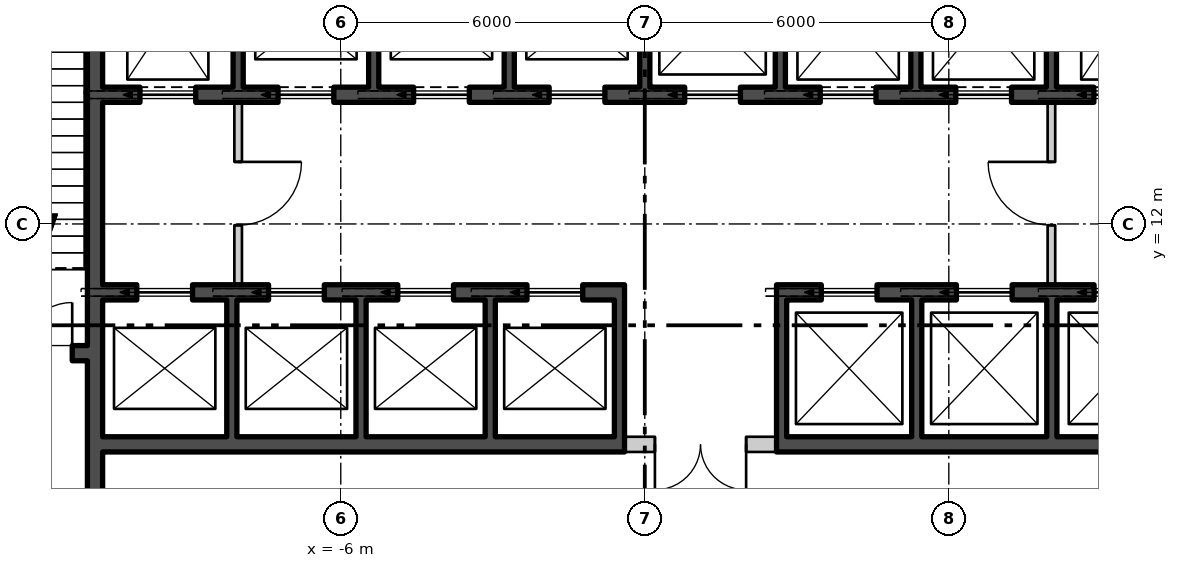
"""IFC4 building model, lengths in metres.
Left out: names, types, materials, properties, quantities, classifications, styles, units other than length and angle.
Written with IfcOpenShell. Run it as: python <this file> out.ifc"""

import sys

from ifc_helpers import new_model, si_unit, direction, frame, frame_2d, origin, place, context, subcontext, project, spatial, rectangle, extrude, element, fill, save


model = new_model("IFC4")
c1 = context("Model", 3, precision=1e-05, world=origin(), true_north=direction((0.0, 1.0)))
c2 = subcontext(c1, "Body", "Model", "MODEL_VIEW")
j1 = project(units=[si_unit("LENGTHUNIT", "METRE"), si_unit("PLANEANGLEUNIT", "RADIAN")], contexts=[c1])
p1 = place(None, origin())
s1 = spatial("IfcSite", under=j1, at=p1, CompositionType="ELEMENT")
p2 = place(p1, origin())
s2 = spatial("IfcBuilding", under=s1, at=p2, CompositionType="ELEMENT")
p3 = place(p2, origin())
s3 = spatial("IfcBuildingStorey", under=s2, at=p3, CompositionType="ELEMENT", Elevation=0.0)
p4 = place(p3, frame((-10.85, 0.6, 0.0), z_axis=(0.0, 0.0, 1.0), x_axis=(0.0, 1.0, 0.0)))
e1 = element("IfcWall", 1, at=p4, inside=s3, PredefinedType="SHEAR", context=c2, shape_type="SweptSolid", body=[
    extrude(rectangle(XDim=16.8, YDim=0.3, at=frame_2d((8.4, 0.0))), origin(), (0.0, 0.0, 1.0), 8.18),
])
p5 = place(p4, frame((1.525, 0.0, 0.0)))
e2 = element("IfcOpeningElement", 2, at=p5, cuts=e1, PredefinedType="OPENING", context=c2, shape_type="SweptSolid", body=[
    extrude(rectangle(XDim=1.0, YDim=2.1, at=frame_2d((0.5, 1.05))), frame((0.0, 0.16, 0.0), z_axis=(0.0, -1.0, 0.0), x_axis=(1.0, 0.0, 0.0)), (0.0, 0.0, 1.0), 0.32),
])
p6 = place(p3, frame((-14.2, 9.45, 0.0), z_axis=(0.0, 0.0, 1.0), x_axis=(1.0, 0.0, 0.0)))
e3 = element("IfcWall", 3, at=p6, inside=s3, PredefinedType="SHEAR", context=c2, shape_type="SweptSolid", body=[
    extrude(rectangle(XDim=3.2, YDim=0.3, at=frame_2d((1.6, 0.0))), origin(), (0.0, 0.0, 1.0), 8.18),
])
p7 = place(p6, frame((1.9, 0.0, 0.0)))
e4 = element("IfcOpeningElement", 4, at=p7, cuts=e3, PredefinedType="OPENING", context=c2, shape_type="SweptSolid", body=[
    extrude(rectangle(XDim=1.0, YDim=2.1, at=frame_2d((0.5, 1.05))), frame((0.0, 0.16, 0.0), z_axis=(0.0, -1.0, 0.0), x_axis=(1.0, 0.0, 0.0)), (0.0, 0.0, 1.0), 0.32),
])
p8 = place(p3, frame((-10.7, 14.55, 0.0), z_axis=(0.0, 0.0, 1.0), x_axis=(1.0, 0.0, 0.0)))
e5 = element("IfcWall", 5, at=p8, inside=s3, PredefinedType="SHEAR", context=c2, shape_type="SweptSolid", body=[
    extrude(rectangle(XDim=21.4, YDim=0.3, at=frame_2d((10.7, 0.0))), origin(), (0.0, 0.0, 1.0), 8.18),
])
p9 = place(p8, frame((0.738, 0.0, 0.0)))
e6 = element("IfcOpeningElement", 6, at=p9, cuts=e5, PredefinedType="OPENING", context=c2, shape_type="SweptSolid", body=[
    extrude(rectangle(XDim=1.1, YDim=2.1, at=frame_2d((0.55, 1.05))), frame((0.0, 0.16, 0.0), z_axis=(0.0, -1.0, 0.0), x_axis=(1.0, 0.0, 0.0)), (0.0, 0.0, 1.0), 0.32),
])
p10 = place(p8, frame((3.462, 0.0, 0.0)))
e7 = element("IfcOpeningElement", 7, at=p10, cuts=e5, PredefinedType="OPENING", context=c2, shape_type="SweptSolid", body=[
    extrude(rectangle(XDim=1.1, YDim=2.1, at=frame_2d((0.55, 1.05))), frame((0.0, 0.16, 0.0), z_axis=(0.0, -1.0, 0.0), x_axis=(1.0, 0.0, 0.0)), (0.0, 0.0, 1.0), 0.32),
])
p11 = place(p8, frame((6.138, 0.0, 0.0)))
e8 = element("IfcOpeningElement", 8, at=p11, cuts=e5, PredefinedType="OPENING", context=c2, shape_type="SweptSolid", body=[
    extrude(rectangle(XDim=1.1, YDim=2.1, at=frame_2d((0.55, 1.05))), frame((0.0, 0.16, 0.0), z_axis=(0.0, -1.0, 0.0), x_axis=(1.0, 0.0, 0.0)), (0.0, 0.0, 1.0), 0.32),
])
p12 = place(p8, frame((8.812, 0.0, 0.0)))
e9 = element("IfcOpeningElement", 9, at=p12, cuts=e5, PredefinedType="OPENING", context=c2, shape_type="SweptSolid", body=[
    extrude(rectangle(XDim=1.1, YDim=2.1, at=frame_2d((0.55, 1.05))), frame((0.0, 0.16, 0.0), z_axis=(0.0, -1.0, 0.0), x_axis=(1.0, 0.0, 0.0)), (0.0, 0.0, 1.0), 0.32),
])
p13 = place(p8, frame((11.488, 0.0, 0.0)))
e10 = element("IfcOpeningElement", 10, at=p13, cuts=e5, PredefinedType="OPENING", context=c2, shape_type="SweptSolid", body=[
    extrude(rectangle(XDim=1.1, YDim=2.1, at=frame_2d((0.55, 1.05))), frame((0.0, 0.16, 0.0), z_axis=(0.0, -1.0, 0.0), x_axis=(1.0, 0.0, 0.0)), (0.0, 0.0, 1.0), 0.32),
])
p14 = place(p8, frame((14.162, 0.0, 0.0)))
e11 = element("IfcOpeningElement", 11, at=p14, cuts=e5, PredefinedType="OPENING", context=c2, shape_type="SweptSolid", body=[
    extrude(rectangle(XDim=1.1, YDim=2.1, at=frame_2d((0.55, 1.05))), frame((0.0, 0.16, 0.0), z_axis=(0.0, -1.0, 0.0), x_axis=(1.0, 0.0, 0.0)), (0.0, 0.0, 1.0), 0.32),
])
p15 = place(p8, frame((16.837, 0.0, 0.0)))
e12 = element("IfcOpeningElement", 12, at=p15, cuts=e5, PredefinedType="OPENING", context=c2, shape_type="SweptSolid", body=[
    extrude(rectangle(XDim=1.1, YDim=2.1, at=frame_2d((0.55, 1.05))), frame((0.0, 0.16, 0.0), z_axis=(0.0, -1.0, 0.0), x_axis=(1.0, 0.0, 0.0)), (0.0, 0.0, 1.0), 0.32),
])
p16 = place(p8, frame((19.562, 0.0, 0.0)))
e13 = element("IfcOpeningElement", 13, at=p16, cuts=e5, PredefinedType="OPENING", context=c2, shape_type="SweptSolid", body=[
    extrude(rectangle(XDim=1.1, YDim=2.1, at=frame_2d((0.55, 1.05))), frame((0.0, 0.16, 0.0), z_axis=(0.0, -1.0, 0.0), x_axis=(1.0, 0.0, 0.0)), (0.0, 0.0, 1.0), 0.32),
])
p17 = place(p3, frame((-10.7, 10.65, 0.0), z_axis=(0.0, 0.0, 1.0), x_axis=(1.0, 0.0, 0.0)))
e14 = element("IfcWall", 14, at=p17, inside=s3, PredefinedType="SHEAR", context=c2, shape_type="SweptSolid", body=[
    extrude(rectangle(XDim=10.3, YDim=0.3, at=frame_2d((5.15, 0.0))), origin(), (0.0, 0.0, 1.0), 8.18),
])
p18 = place(p17, frame((0.675, 0.0, 0.0)))
e15 = element("IfcOpeningElement", 15, at=p18, cuts=e14, PredefinedType="OPENING", context=c2, shape_type="SweptSolid", body=[
    extrude(rectangle(XDim=1.1, YDim=2.1, at=frame_2d((0.55, 1.05))), frame((0.0, 0.16, 0.0), z_axis=(0.0, -1.0, 0.0), x_axis=(1.0, 0.0, 0.0)), (0.0, 0.0, 1.0), 0.32),
])
p19 = place(p17, frame((3.275, 0.0, 0.0)))
e16 = element("IfcOpeningElement", 16, at=p19, cuts=e14, PredefinedType="OPENING", context=c2, shape_type="SweptSolid", body=[
    extrude(rectangle(XDim=1.1, YDim=2.1, at=frame_2d((0.55, 1.05))), frame((0.0, 0.16, 0.0), z_axis=(0.0, -1.0, 0.0), x_axis=(1.0, 0.0, 0.0)), (0.0, 0.0, 1.0), 0.32),
])
p20 = place(p17, frame((5.825, 0.0, 0.0)))
e17 = element("IfcOpeningElement", 17, at=p20, cuts=e14, PredefinedType="OPENING", context=c2, shape_type="SweptSolid", body=[
    extrude(rectangle(XDim=1.1, YDim=2.1, at=frame_2d((0.55, 1.05))), frame((0.0, 0.16, 0.0), z_axis=(0.0, -1.0, 0.0), x_axis=(1.0, 0.0, 0.0)), (0.0, 0.0, 1.0), 0.32),
])
p21 = place(p17, frame((8.375, 0.0, 0.0)))
e18 = element("IfcOpeningElement", 18, at=p21, cuts=e14, PredefinedType="OPENING", context=c2, shape_type="SweptSolid", body=[
    extrude(rectangle(XDim=1.1, YDim=2.1, at=frame_2d((0.55, 1.05))), frame((0.0, 0.16, 0.0), z_axis=(0.0, -1.0, 0.0), x_axis=(1.0, 0.0, 0.0)), (0.0, 0.0, 1.0), 0.32),
])
p22 = place(p3, frame((-10.7, 7.65, 0.0), z_axis=(0.0, 0.0, 1.0), x_axis=(1.0, 0.0, 0.0)))
e19 = element("IfcWall", 19, at=p22, inside=s3, PredefinedType="SHEAR", context=c2, shape_type="SweptSolid", body=[
    extrude(rectangle(XDim=10.3, YDim=0.3, at=frame_2d((5.15, 0.0))), origin(), (0.0, 0.0, 1.0), 8.18),
])
p23 = place(p3, frame((2.6, 10.65, 0.0), z_axis=(0.0, 0.0, 1.0), x_axis=(1.0, 0.0, 0.0)))
e20 = element("IfcWall", 20, at=p23, inside=s3, PredefinedType="SHEAR", context=c2, shape_type="SweptSolid", body=[
    extrude(rectangle(XDim=8.1, YDim=0.3, at=frame_2d((4.05, 0.0))), origin(), (0.0, 0.0, 1.0), 8.18),
])
p24 = place(p23, frame((0.883, 0.0, 0.0)))
e21 = element("IfcOpeningElement", 21, at=p24, cuts=e20, PredefinedType="OPENING", context=c2, shape_type="SweptSolid", body=[
    extrude(rectangle(XDim=1.1, YDim=2.1, at=frame_2d((0.55, 1.05))), frame((0.0, 0.16, 0.0), z_axis=(0.0, -1.0, 0.0), x_axis=(1.0, 0.0, 0.0)), (0.0, 0.0, 1.0), 0.32),
])
p25 = place(p23, frame((3.55, 0.0, 0.0)))
e22 = element("IfcOpeningElement", 22, at=p25, cuts=e20, PredefinedType="OPENING", context=c2, shape_type="SweptSolid", body=[
    extrude(rectangle(XDim=1.1, YDim=2.1, at=frame_2d((0.55, 1.05))), frame((0.0, 0.16, 0.0), z_axis=(0.0, -1.0, 0.0), x_axis=(1.0, 0.0, 0.0)), (0.0, 0.0, 1.0), 0.32),
])
p26 = place(p23, frame((6.267, 0.0, 0.0)))
e23 = element("IfcOpeningElement", 23, at=p26, cuts=e20, PredefinedType="OPENING", context=c2, shape_type="SweptSolid", body=[
    extrude(rectangle(XDim=1.1, YDim=2.1, at=frame_2d((0.55, 1.05))), frame((0.0, 0.16, 0.0), z_axis=(0.0, -1.0, 0.0), x_axis=(1.0, 0.0, 0.0)), (0.0, 0.0, 1.0), 0.32),
])
p27 = place(p3, frame((2.6, 7.65, 0.0), z_axis=(0.0, 0.0, 1.0), x_axis=(1.0, 0.0, 0.0)))
e24 = element("IfcWall", 24, at=p27, inside=s3, PredefinedType="SHEAR", context=c2, shape_type="SweptSolid", body=[
    extrude(rectangle(XDim=8.1, YDim=0.3, at=frame_2d((4.05, 0.0))), origin(), (0.0, 0.0, 1.0), 8.18),
])
for number, where, z_axis, x_axis in (
    (25, (-8.025, 14.7, 0.0), (0.0, 0.0, 1.0), (0.0, 1.0, 0.0)),
    (26, (-5.35, 14.7, 0.0), (0.0, 0.0, 1.0), (0.0, 1.0, 0.0)),
    (27, (-2.675, 14.7, 0.0), (0.0, 0.0, 1.0), (0.0, 1.0, 0.0)),
    (28, (0.0, 14.7, 0.0), (0.0, 0.0, 1.0), (0.0, 1.0, 0.0)),
    (29, (2.675, 14.7, 0.0), (0.0, 0.0, 1.0), (0.0, 1.0, 0.0)),
    (30, (5.35, 14.7, 0.0), (0.0, 0.0, 1.0), (0.0, 1.0, 0.0)),
    (31, (8.025, 14.7, 0.0), (0.0, 0.0, 1.0), (0.0, 1.0, 0.0)),
    (32, (-8.15, 7.8, 0.0), (0.0, 0.0, 1.0), (0.0, 1.0, 0.0)),
    (33, (-5.6, 7.8, 0.0), (0.0, 0.0, 1.0), (0.0, 1.0, 0.0)),
    (34, (-3.05, 7.8, 0.0), (0.0, 0.0, 1.0), (0.0, 1.0, 0.0)),
    (35, (-0.5, 7.8, 0.0), (0.0, 0.0, 1.0), (0.0, 1.0, 0.0)),
    (36, (2.7, 7.8, 0.0), (0.0, 0.0, 1.0), (0.0, 1.0, 0.0)),
    (37, (5.367, 7.8, 0.0), (0.0, 0.0, 1.0), (0.0, 1.0, 0.0)),
    (38, (8.033, 7.8, 0.0), (0.0, 0.0, 1.0), (0.0, 1.0, 0.0)),
):
    element("IfcWall", number, at=place(p3, frame(where, z_axis=z_axis, x_axis=x_axis)), inside=s3, PredefinedType="SHEAR", context=c2, shape_type="SweptSolid", body=[
        extrude(rectangle(XDim=2.7, YDim=0.2, at=frame_2d((1.35, 0.0))), origin(), (0.0, 0.0, 1.0), 8.18),
    ])
p28 = place(p3, frame((-8.025, 10.8, 0.0), z_axis=(0.0, 0.0, 1.0), x_axis=(0.0, 1.0, 0.0)))
e39 = element("IfcWall", 39, at=p28, inside=s3, PredefinedType="PARTITIONING", context=c2, shape_type="SweptSolid", body=[
    extrude(rectangle(XDim=3.6, YDim=0.15, at=frame_2d((1.8, 0.0))), origin(), (0.0, 0.0, 1.0), 8.18),
])
p29 = place(p28, frame((1.175, 0.0, 0.0)))
e40 = element("IfcOpeningElement", 40, at=p29, cuts=e39, PredefinedType="OPENING", context=c2, shape_type="SweptSolid", body=[
    extrude(rectangle(XDim=1.25, YDim=2.1, at=frame_2d((0.625, 1.05))), frame((0.0, 0.085, 0.0), z_axis=(0.0, -1.0, 0.0), x_axis=(1.0, 0.0, 0.0)), (0.0, 0.0, 1.0), 0.17),
])
p30 = place(p3, frame((8.025, 10.8, 0.0), z_axis=(0.0, 0.0, 1.0), x_axis=(0.0, 1.0, 0.0)))
e41 = element("IfcWall", 41, at=p30, inside=s3, PredefinedType="PARTITIONING", context=c2, shape_type="SweptSolid", body=[
    extrude(rectangle(XDim=3.6, YDim=0.15, at=frame_2d((1.8, 0.0))), origin(), (0.0, 0.0, 1.0), 8.18),
])
p31 = place(p30, frame((1.175, 0.0, 0.0)))
e42 = element("IfcOpeningElement", 42, at=p31, cuts=e41, PredefinedType="OPENING", context=c2, shape_type="SweptSolid", body=[
    extrude(rectangle(XDim=1.25, YDim=2.1, at=frame_2d((0.625, 1.05))), frame((0.0, 0.085, 0.0), z_axis=(0.0, -1.0, 0.0), x_axis=(1.0, 0.0, 0.0)), (0.0, 0.0, 1.0), 0.17),
])
p32 = place(p3, frame((-0.4, 7.65, 0.0), z_axis=(0.0, 0.0, 1.0), x_axis=(1.0, 0.0, 0.0)))
e43 = element("IfcWall", 43, at=p32, inside=s3, PredefinedType="PARTITIONING", context=c2, shape_type="SweptSolid", body=[
    extrude(rectangle(XDim=3.0, YDim=0.3, at=frame_2d((1.5, 0.0))), origin(), (0.0, 0.0, 1.0), 8.18),
])
p33 = place(p32, frame((0.6, 0.0, 0.0)))
e44 = element("IfcOpeningElement", 44, at=p33, cuts=e43, PredefinedType="OPENING", context=c2, shape_type="SweptSolid", body=[
    extrude(rectangle(XDim=1.8, YDim=2.4, at=frame_2d((0.9, 1.2))), frame((0.0, 0.16, 0.0), z_axis=(0.0, -1.0, 0.0), x_axis=(1.0, 0.0, 0.0)), (0.0, 0.0, 1.0), 0.32),
])
p34 = place(p9, origin())
e45 = element("IfcDoor", 45, at=p34, inside=s3, OperationType="SLIDING_TO_LEFT", PredefinedType="DOOR", context=c2, shape_type="SweptSolid", body=[
    extrude(rectangle(XDim=1.1, YDim=2.1, at=frame_2d((0.55, 1.05))), frame((0.0, 0.025, 0.0), z_axis=(0.0, -1.0, 0.0), x_axis=(1.0, 0.0, 0.0)), (0.0, 0.0, 1.0), 0.05),
])
fill(e6, e45)
p35 = place(p10, origin())
e46 = element("IfcDoor", 46, at=p35, inside=s3, OperationType="SLIDING_TO_LEFT", PredefinedType="DOOR", context=c2, shape_type="SweptSolid", body=[
    extrude(rectangle(XDim=1.1, YDim=2.1, at=frame_2d((0.55, 1.05))), frame((0.0, 0.025, 0.0), z_axis=(0.0, -1.0, 0.0), x_axis=(1.0, 0.0, 0.0)), (0.0, 0.0, 1.0), 0.05),
])
fill(e7, e46)
p36 = place(p11, origin())
e47 = element("IfcDoor", 47, at=p36, inside=s3, OperationType="SLIDING_TO_LEFT", PredefinedType="DOOR", context=c2, shape_type="SweptSolid", body=[
    extrude(rectangle(XDim=1.1, YDim=2.1, at=frame_2d((0.55, 1.05))), frame((0.0, 0.025, 0.0), z_axis=(0.0, -1.0, 0.0), x_axis=(1.0, 0.0, 0.0)), (0.0, 0.0, 1.0), 0.05),
])
fill(e8, e47)
p37 = place(p12, origin())
e48 = element("IfcDoor", 48, at=p37, inside=s3, OperationType="SLIDING_TO_LEFT", PredefinedType="DOOR", context=c2, shape_type="SweptSolid", body=[
    extrude(rectangle(XDim=1.1, YDim=2.1, at=frame_2d((0.55, 1.05))), frame((0.0, 0.025, 0.0), z_axis=(0.0, -1.0, 0.0), x_axis=(1.0, 0.0, 0.0)), (0.0, 0.0, 1.0), 0.05),
])
fill(e9, e48)
p38 = place(p13, origin())
e49 = element("IfcDoor", 49, at=p38, inside=s3, OperationType="SLIDING_TO_LEFT", PredefinedType="DOOR", context=c2, shape_type="SweptSolid", body=[
    extrude(rectangle(XDim=1.1, YDim=2.1, at=frame_2d((0.55, 1.05))), frame((0.0, 0.025, 0.0), z_axis=(0.0, -1.0, 0.0), x_axis=(1.0, 0.0, 0.0)), (0.0, 0.0, 1.0), 0.05),
])
fill(e10, e49)
p39 = place(p14, origin())
e50 = element("IfcDoor", 50, at=p39, inside=s3, OperationType="SLIDING_TO_LEFT", PredefinedType="DOOR", context=c2, shape_type="SweptSolid", body=[
    extrude(rectangle(XDim=1.1, YDim=2.1, at=frame_2d((0.55, 1.05))), frame((0.0, 0.025, 0.0), z_axis=(0.0, -1.0, 0.0), x_axis=(1.0, 0.0, 0.0)), (0.0, 0.0, 1.0), 0.05),
])
fill(e11, e50)
p40 = place(p15, origin())
e51 = element("IfcDoor", 51, at=p40, inside=s3, OperationType="SLIDING_TO_LEFT", PredefinedType="DOOR", context=c2, shape_type="SweptSolid", body=[
    extrude(rectangle(XDim=1.1, YDim=2.1, at=frame_2d((0.55, 1.05))), frame((0.0, 0.025, 0.0), z_axis=(0.0, -1.0, 0.0), x_axis=(1.0, 0.0, 0.0)), (0.0, 0.0, 1.0), 0.05),
])
fill(e12, e51)
p41 = place(p16, origin())
e52 = element("IfcDoor", 52, at=p41, inside=s3, OperationType="SLIDING_TO_LEFT", PredefinedType="DOOR", context=c2, shape_type="SweptSolid", body=[
    extrude(rectangle(XDim=1.1, YDim=2.1, at=frame_2d((0.55, 1.05))), frame((0.0, 0.025, 0.0), z_axis=(0.0, -1.0, 0.0), x_axis=(1.0, 0.0, 0.0)), (0.0, 0.0, 1.0), 0.05),
])
fill(e13, e52)
p42 = place(p18, origin())
e53 = element("IfcDoor", 53, at=p42, inside=s3, OperationType="SLIDING_TO_LEFT", PredefinedType="DOOR", context=c2, shape_type="SweptSolid", body=[
    extrude(rectangle(XDim=1.1, YDim=2.1, at=frame_2d((0.55, 1.05))), frame((0.0, 0.025, 0.0), z_axis=(0.0, -1.0, 0.0), x_axis=(1.0, 0.0, 0.0)), (0.0, 0.0, 1.0), 0.05),
])
fill(e15, e53)
p43 = place(p19, origin())
e54 = element("IfcDoor", 54, at=p43, inside=s3, OperationType="SLIDING_TO_LEFT", PredefinedType="DOOR", context=c2, shape_type="SweptSolid", body=[
    extrude(rectangle(XDim=1.1, YDim=2.1, at=frame_2d((0.55, 1.05))), frame((0.0, 0.025, 0.0), z_axis=(0.0, -1.0, 0.0), x_axis=(1.0, 0.0, 0.0)), (0.0, 0.0, 1.0), 0.05),
])
fill(e16, e54)
p44 = place(p20, origin())
e55 = element("IfcDoor", 55, at=p44, inside=s3, OperationType="SLIDING_TO_LEFT", PredefinedType="DOOR", context=c2, shape_type="SweptSolid", body=[
    extrude(rectangle(XDim=1.1, YDim=2.1, at=frame_2d((0.55, 1.05))), frame((0.0, 0.025, 0.0), z_axis=(0.0, -1.0, 0.0), x_axis=(1.0, 0.0, 0.0)), (0.0, 0.0, 1.0), 0.05),
])
fill(e17, e55)
p45 = place(p21, origin())
e56 = element("IfcDoor", 56, at=p45, inside=s3, OperationType="SLIDING_TO_LEFT", PredefinedType="DOOR", context=c2, shape_type="SweptSolid", body=[
    extrude(rectangle(XDim=1.1, YDim=2.1, at=frame_2d((0.55, 1.05))), frame((0.0, 0.025, 0.0), z_axis=(0.0, -1.0, 0.0), x_axis=(1.0, 0.0, 0.0)), (0.0, 0.0, 1.0), 0.05),
])
fill(e18, e56)
p46 = place(p24, origin())
e57 = element("IfcDoor", 57, at=p46, inside=s3, OperationType="SLIDING_TO_LEFT", PredefinedType="DOOR", context=c2, shape_type="SweptSolid", body=[
    extrude(rectangle(XDim=1.1, YDim=2.1, at=frame_2d((0.55, 1.05))), frame((0.0, 0.025, 0.0), z_axis=(0.0, -1.0, 0.0), x_axis=(1.0, 0.0, 0.0)), (0.0, 0.0, 1.0), 0.05),
])
fill(e21, e57)
p47 = place(p25, origin())
e58 = element("IfcDoor", 58, at=p47, inside=s3, OperationType="SLIDING_TO_LEFT", PredefinedType="DOOR", context=c2, shape_type="SweptSolid", body=[
    extrude(rectangle(XDim=1.1, YDim=2.1, at=frame_2d((0.55, 1.05))), frame((0.0, 0.025, 0.0), z_axis=(0.0, -1.0, 0.0), x_axis=(1.0, 0.0, 0.0)), (0.0, 0.0, 1.0), 0.05),
])
fill(e22, e58)
p48 = place(p26, origin())
e59 = element("IfcDoor", 59, at=p48, inside=s3, OperationType="SLIDING_TO_LEFT", PredefinedType="DOOR", context=c2, shape_type="SweptSolid", body=[
    extrude(rectangle(XDim=1.1, YDim=2.1, at=frame_2d((0.55, 1.05))), frame((0.0, 0.025, 0.0), z_axis=(0.0, -1.0, 0.0), x_axis=(1.0, 0.0, 0.0)), (0.0, 0.0, 1.0), 0.05),
])
fill(e23, e59)
p49 = place(p29, origin())
e60 = element("IfcDoor", 60, at=p49, inside=s3, OperationType="SINGLE_SWING_RIGHT", PredefinedType="DOOR", context=c2, shape_type="SweptSolid", body=[
    extrude(rectangle(XDim=1.25, YDim=2.1, at=frame_2d((0.625, 1.05))), frame((0.0, 0.025, 0.0), z_axis=(0.0, -1.0, 0.0), x_axis=(1.0, 0.0, 0.0)), (0.0, 0.0, 1.0), 0.05),
])
fill(e40, e60)
p50 = place(p7, origin())
e61 = element("IfcDoor", 61, at=p50, inside=s3, OperationType="SINGLE_SWING_LEFT", PredefinedType="DOOR", context=c2, shape_type="SweptSolid", body=[
    extrude(rectangle(XDim=1.0, YDim=2.1, at=frame_2d((0.5, 1.05))), frame((0.0, 0.025, 0.0), z_axis=(0.0, -1.0, 0.0), x_axis=(1.0, 0.0, 0.0)), (0.0, 0.0, 1.0), 0.05),
])
fill(e4, e61)
p51 = place(p31, origin())
e62 = element("IfcDoor", 62, at=p51, inside=s3, OperationType="SINGLE_SWING_LEFT", PredefinedType="DOOR", context=c2, shape_type="SweptSolid", body=[
    extrude(rectangle(XDim=1.25, YDim=2.1, at=frame_2d((0.625, 1.05))), frame((0.0, 0.025, 0.0), z_axis=(0.0, -1.0, 0.0), x_axis=(1.0, 0.0, 0.0)), (0.0, 0.0, 1.0), 0.05),
])
fill(e42, e62)
p52 = place(p33, origin())
e63 = element("IfcDoor", 63, at=p52, inside=s3, OperationType="DOUBLE_DOOR_SINGLE_SWING", PredefinedType="DOOR", context=c2, shape_type="SweptSolid", body=[
    extrude(rectangle(XDim=1.8, YDim=2.4, at=frame_2d((0.9, 1.2))), frame((0.0, 0.025, 0.0), z_axis=(0.0, -1.0, 0.0), x_axis=(1.0, 0.0, 0.0)), (0.0, 0.0, 1.0), 0.05),
])
fill(e44, e63)
save(model, sys.argv[1])
